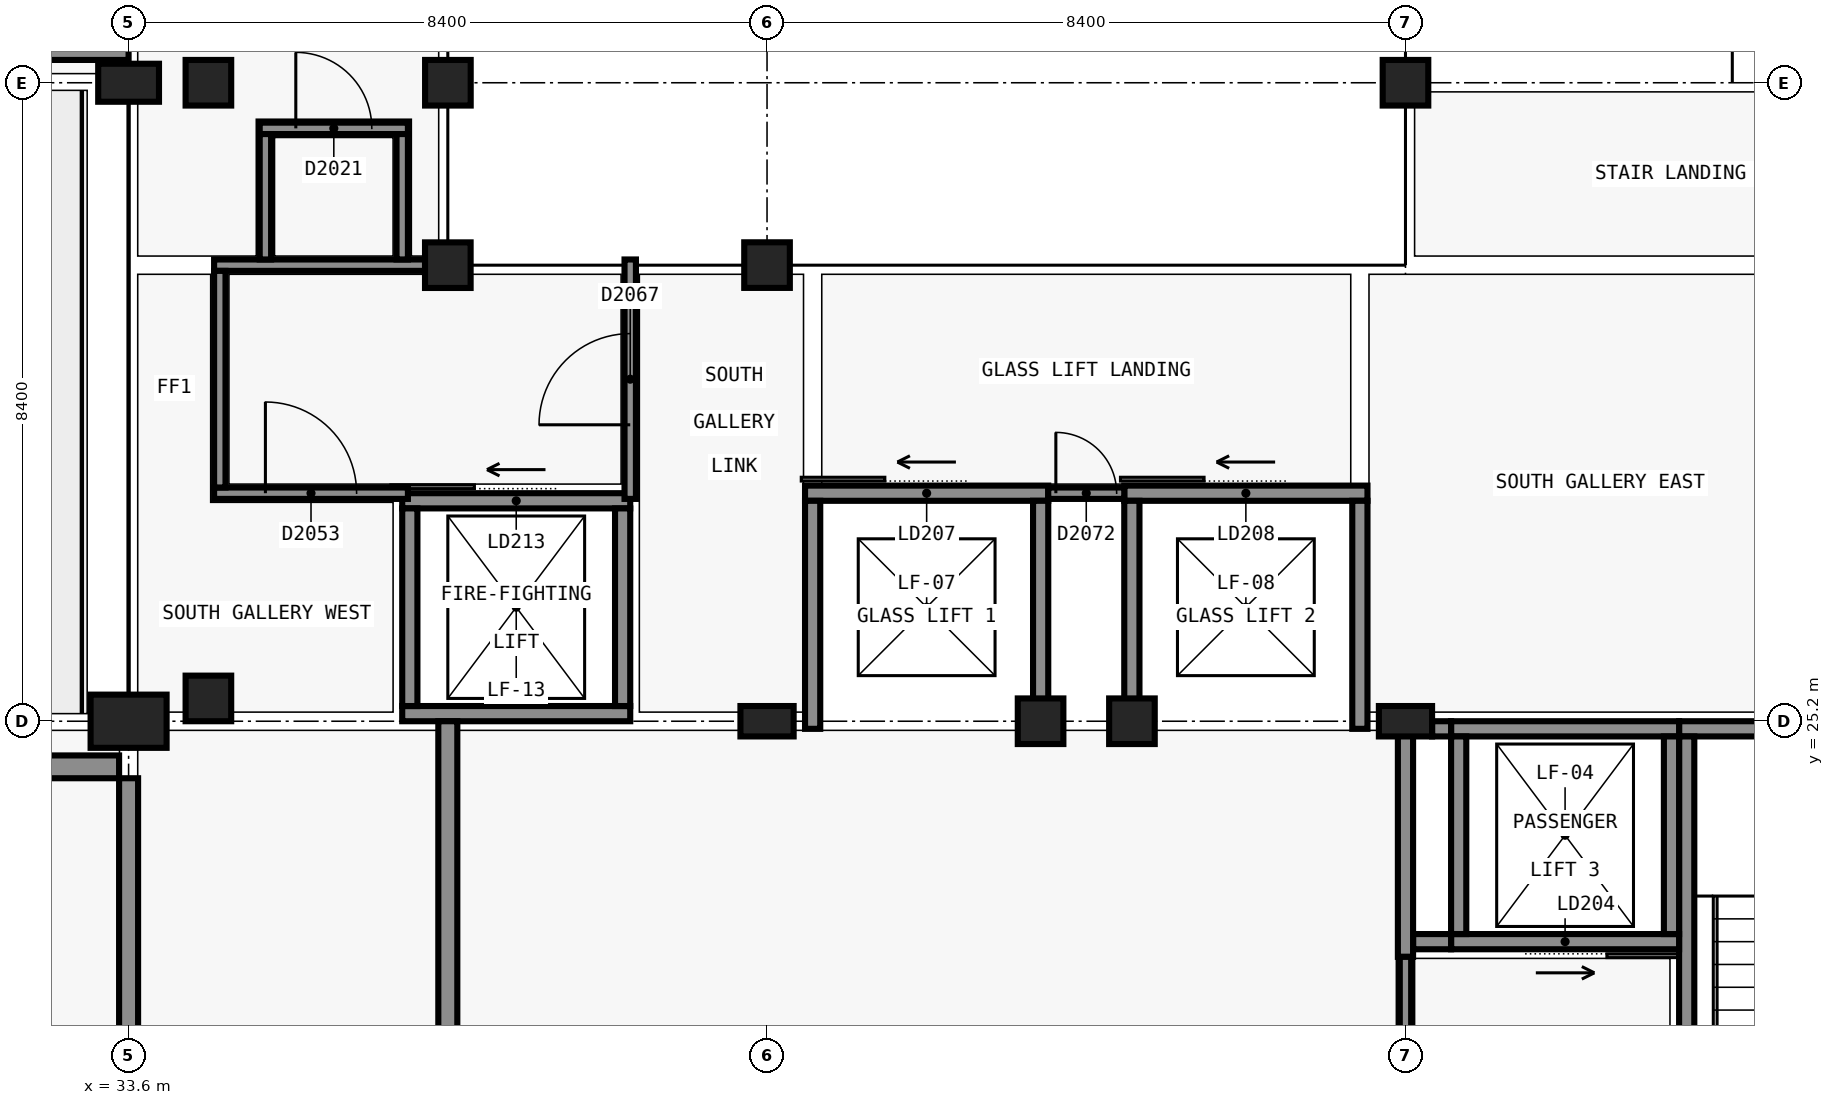
"""IFC4 building model, lengths in metres.
Left out: names, types, materials, properties, quantities, classifications, styles, units other than length and angle.
Written with IfcOpenShell. Run it as: python <this file> out.ifc"""

import sys

from ifc_helpers import new_model, si_unit, direction, frame, frame_2d, origin, origin_2d, place, context, subcontext, project, spatial, rectangle, extrude, element, fill, save


model = new_model("IFC4")
c1 = context("Model", 3, precision=1e-05, world=origin(), true_north=direction((0.0, 1.0)))
c2 = subcontext(c1, "Body", "Model", "MODEL_VIEW")
j1 = project(units=[si_unit("LENGTHUNIT", "METRE"), si_unit("PLANEANGLEUNIT", "RADIAN")], contexts=[c1])
p1 = place(None, origin())
s1 = spatial("IfcSite", under=j1, at=p1, CompositionType="ELEMENT")
p2 = place(p1, origin())
s2 = spatial("IfcBuilding", under=s1, at=p2, CompositionType="ELEMENT")
p3 = place(p2, frame((0.0, 0.0, 10.2)))
s3 = spatial("IfcBuildingStorey", under=s2, at=p3, CompositionType="ELEMENT", Elevation=10.2)
p4 = place(p3, frame((54.0, 25.1, 0.0), z_axis=(0.0, 0.0, 1.0), x_axis=(1.0, 0.0, 0.0)))
e1 = element("IfcWall", 1, at=p4, inside=s3, PredefinedType="SHEAR", context=c2, shape_type="SweptSolid", body=[
    extrude(rectangle(XDim=4.8, YDim=0.2, at=frame_2d((2.4, 0.0))), origin(), (0.0, 0.0, 1.0), 4.8),
])
p5 = place(p3, frame((54.1, 15.8, 0.0), z_axis=(0.0, 0.0, 1.0), x_axis=(0.0, 1.0, 0.0)))
e2 = element("IfcWall", 2, at=p5, inside=s3, PredefinedType="SHEAR", context=c2, shape_type="SweptSolid", body=[
    extrude(rectangle(XDim=9.2, YDim=0.2, at=frame_2d((4.6, 0.0))), origin(), (0.0, 0.0, 1.0), 4.8),
])
p6 = place(p5, frame((0.5, 0.0, 0.0)))
e3 = element("IfcOpeningElement", 3, at=p6, cuts=e2, PredefinedType="OPENING", context=c2, shape_type="SweptSolid", body=[
    extrude(rectangle(XDim=1.2, YDim=2.1, at=frame_2d((0.6, 1.05))), frame((0.0, 0.11, 0.0), z_axis=(0.0, -1.0, 0.0), x_axis=(1.0, 0.0, 0.0)), (0.0, 0.0, 1.0), 0.22),
])
p7 = place(p3, frame((54.0, 22.3, 0.0), z_axis=(0.0, 0.0, 1.0), x_axis=(-1.0, 0.0, 0.0)))
e4 = element("IfcWall", 4, at=p7, inside=s3, PredefinedType="SHEAR", context=c2, shape_type="SweptSolid", body=[
    extrude(rectangle(XDim=3.0, YDim=0.2, at=frame_2d((1.5, 0.0))), origin(), (0.0, 0.0, 1.0), 4.8),
])
p8 = place(p7, frame((0.95, 0.0, 0.0)))
e5 = element("IfcOpeningElement", 5, at=p8, cuts=e4, PredefinedType="OPENING", context=c2, shape_type="SweptSolid", body=[
    extrude(rectangle(XDim=1.1, YDim=2.1, at=frame_2d((0.55, 1.05))), frame((0.0, 0.11, 0.0), z_axis=(0.0, -1.0, 0.0), x_axis=(1.0, 0.0, 0.0)), (0.0, 0.0, 1.0), 0.22),
])
p9 = place(p3, frame((51.0, 25.1, 0.0), z_axis=(0.0, 0.0, 1.0), x_axis=(1.0, 0.0, 0.0)))
e6 = element("IfcWall", 6, at=p9, inside=s3, PredefinedType="SHEAR", context=c2, shape_type="SweptSolid", body=[
    extrude(rectangle(XDim=3.0, YDim=0.2, at=frame_2d((1.5, 0.0))), origin(), (0.0, 0.0, 1.0), 4.8),
])
for number, where, z_axis, x_axis in (
    (7, (51.1, 22.4, 0.0), (0.0, 0.0, 1.0), (0.0, 1.0, 0.0)),
    (8, (53.9, 25.0, 0.0), (0.0, 0.0, 1.0), (0.0, -1.0, 0.0)),
):
    element("IfcWall", number, at=place(p3, frame(where, z_axis=z_axis, x_axis=x_axis)), inside=s3, PredefinedType="SHEAR", context=c2, shape_type="SweptSolid", body=[
        extrude(rectangle(XDim=2.6, YDim=0.2, at=frame_2d((1.3, 0.0))), origin(), (0.0, 0.0, 1.0), 4.8),
    ])
p10 = place(p3, frame((40.2, 25.3, 0.0), z_axis=(0.0, 0.0, 1.0), x_axis=(-1.0, 0.0, 0.0)))
e9 = element("IfcWall", 9, at=p10, inside=s3, PredefinedType="SHEAR", context=c2, shape_type="SweptSolid", body=[
    extrude(rectangle(XDim=3.0, YDim=0.2, at=frame_2d((1.5, 0.0))), origin(), (0.0, 0.0, 1.0), 4.8),
])
p11 = place(p3, frame((37.2, 28.1, 0.0), z_axis=(0.0, 0.0, 1.0), x_axis=(1.0, 0.0, 0.0)))
e10 = element("IfcWall", 10, at=p11, inside=s3, PredefinedType="SHEAR", context=c2, shape_type="SweptSolid", body=[
    extrude(rectangle(XDim=3.0, YDim=0.2, at=frame_2d((1.5, 0.0))), origin(), (0.0, 0.0, 1.0), 4.8),
])
p12 = place(p11, frame((0.95, 0.0, 0.0)))
e11 = element("IfcOpeningElement", 11, at=p12, cuts=e10, PredefinedType="OPENING", context=c2, shape_type="SweptSolid", body=[
    extrude(rectangle(XDim=1.1, YDim=2.1, at=frame_2d((0.55, 1.05))), frame((0.0, 0.11, 0.0), z_axis=(0.0, -1.0, 0.0), x_axis=(1.0, 0.0, 0.0)), (0.0, 0.0, 1.0), 0.22),
])
for number, where, z_axis, x_axis in (
    (12, (37.3, 25.4, 0.0), (0.0, 0.0, 1.0), (0.0, 1.0, 0.0)),
    (13, (40.1, 28.0, 0.0), (0.0, 0.0, 1.0), (0.0, -1.0, 0.0)),
):
    element("IfcWall", number, at=place(p3, frame(where, z_axis=z_axis, x_axis=x_axis)), inside=s3, PredefinedType="SHEAR", context=c2, shape_type="SweptSolid", body=[
        extrude(rectangle(XDim=2.6, YDim=0.2, at=frame_2d((1.3, 0.0))), origin(), (0.0, 0.0, 1.0), 4.8),
    ])
p13 = place(p3, frame((33.6, 25.2, 0.0), z_axis=(0.0, 0.0, 1.0), x_axis=(1.0, 0.0, 0.0)))
e14 = element("IfcColumn", 14, at=p13, inside=s3, PredefinedType="COLUMN", context=c2, shape_type="SweptSolid", body=[
    extrude(rectangle(XDim=1.0, YDim=0.7, at=origin_2d()), origin(), (0.0, 0.0, 1.0), 4.8),
])
for number, where, z_axis, x_axis in (
    (15, (42.0, 25.2, 0.0), (0.0, 0.0, 1.0), (1.0, 0.0, 0.0)),
    (16, (50.4, 25.2, 0.0), (0.0, 0.0, 1.0), (1.0, 0.0, 0.0)),
):
    element("IfcColumn", number, at=place(p3, frame(where, z_axis=z_axis, x_axis=x_axis)), inside=s3, PredefinedType="COLUMN", context=c2, shape_type="SweptSolid", body=[
        extrude(rectangle(XDim=0.7, YDim=0.4, at=origin_2d()), origin(), (0.0, 0.0, 1.0), 4.8),
    ])
p14 = place(p3, frame((33.6, 33.6, 0.0), z_axis=(0.0, 0.0, 1.0), x_axis=(1.0, 0.0, 0.0)))
e17 = element("IfcColumn", 17, at=p14, inside=s3, PredefinedType="COLUMN", context=c2, shape_type="SweptSolid", body=[
    extrude(rectangle(XDim=0.8, YDim=0.5, at=origin_2d()), origin(), (0.0, 0.0, 1.0), 4.8),
])
for number, where, z_axis, x_axis in (
    (18, (50.4, 33.6, 0.0), (0.0, 0.0, 1.0), (1.0, 0.0, 0.0)),
    (19, (34.65, 25.5, 0.0), (0.0, 0.0, 1.0), (1.0, 0.0, 0.0)),
    (20, (34.65, 33.6, 0.0), (0.0, 0.0, 1.0), (1.0, 0.0, 0.0)),
):
    element("IfcColumn", number, at=place(p3, frame(where, z_axis=z_axis, x_axis=x_axis)), inside=s3, PredefinedType="COLUMN", context=c2, shape_type="SweptSolid", body=[
        extrude(rectangle(XDim=0.6, YDim=0.6, at=origin_2d()), origin(), (0.0, 0.0, 1.0), 4.8),
    ])
p15 = place(p3, frame((51.0, 22.3, 0.0), z_axis=(0.0, 0.0, 1.0), x_axis=(-1.0, 0.0, 0.0)))
e21 = element("IfcWall", 21, at=p15, inside=s3, PredefinedType="SHEAR", context=c2, shape_type="SweptSolid", body=[
    extrude(rectangle(XDim=0.5, YDim=0.2, at=frame_2d((0.25, 0.0))), origin(), (0.0, 0.0, 1.0), 4.8),
])
p16 = place(p3, frame((50.75, 25.1, 0.0), z_axis=(0.0, 0.0, 1.0), x_axis=(1.0, 0.0, 0.0)))
e22 = element("IfcWall", 22, at=p16, inside=s3, PredefinedType="SHEAR", context=c2, shape_type="SweptSolid", body=[
    extrude(rectangle(XDim=0.25, YDim=0.2, at=frame_2d((0.125, 0.0))), origin(), (0.0, 0.0, 1.0), 4.8),
])
for number, where, z_axis, x_axis in (
    (23, (45.599, 25.2, 0.0), (0.0, 0.0, 1.0), (1.0, 0.0, 0.0)),
    (24, (46.801, 25.2, 0.0), (0.0, 0.0, 1.0), (1.0, 0.0, 0.0)),
    (25, (37.8, 31.2, 0.0), (0.0, 0.0, 1.0), (1.0, 0.0, 0.0)),
    (26, (37.801, 33.6, 0.0), (0.0, 0.0, 1.0), (1.0, 0.0, 0.0)),
    (27, (42.0, 31.201, 0.0), (0.0, 0.0, 1.0), (1.0, 0.0, 0.0)),
):
    element("IfcColumn", number, at=place(p3, frame(where, z_axis=z_axis, x_axis=x_axis)), inside=s3, PredefinedType="COLUMN", context=c2, shape_type="SweptSolid", body=[
        extrude(rectangle(XDim=0.6, YDim=0.6, at=origin_2d()), origin(), (0.0, 0.0, 1.0), 4.8),
    ])
p17 = place(p3, frame((26.95, 24.6, 0.0), z_axis=(0.0, 0.0, 1.0), x_axis=(1.0, 0.0, 0.0)))
e28 = element("IfcWall", 28, at=p17, inside=s3, PredefinedType="SOLIDWALL", context=c2, shape_type="SweptSolid", body=[
    extrude(rectangle(XDim=6.525, YDim=0.3, at=frame_2d((3.262, 0.0))), origin(), (0.0, 0.0, 1.0), 4.5),
])
p18 = place(p17, frame((1.825, 0.0, 0.9)))
e29 = element("IfcOpeningElement", 29, at=p18, cuts=e28, PredefinedType="OPENING", context=c2, shape_type="SweptSolid", body=[
    extrude(rectangle(XDim=2.4, YDim=1.5, at=frame_2d((1.2, 0.75))), frame((0.0, 0.16, 0.0), z_axis=(0.0, -1.0, 0.0), x_axis=(1.0, 0.0, 0.0)), (0.0, 0.0, 1.0), 0.32),
])
p19 = place(p3, frame((33.6, 34.05, 0.0), z_axis=(0.0, 0.0, 1.0), x_axis=(-1.0, 0.0, 0.0)))
e30 = element("IfcWall", 30, at=p19, inside=s3, PredefinedType="SOLIDWALL", context=c2, shape_type="SweptSolid", body=[
    extrude(rectangle(XDim=4.2, YDim=0.3, at=frame_2d((2.1, 0.0))), origin(), (0.0, 0.0, 1.0), 4.5),
])
p20 = place(p3, frame((33.6, 8.6, 0.0), z_axis=(0.0, 0.0, 1.0), x_axis=(0.0, 1.0, 0.0)))
e31 = element("IfcWall", 31, at=p20, inside=s3, PredefinedType="SOLIDWALL", context=c2, shape_type="SweptSolid", body=[
    extrude(rectangle(XDim=15.85, YDim=0.25, at=frame_2d((7.925, 0.0))), origin(), (0.0, 0.0, 1.0), 3.8),
])
p21 = place(p3, frame((37.8, 8.525, 0.0), z_axis=(0.0, 0.0, 1.0), x_axis=(0.0, 1.0, 0.0)))
e32 = element("IfcWall", 32, at=p21, inside=s3, PredefinedType="PARTITIONING", context=c2, shape_type="SweptSolid", body=[
    extrude(rectangle(XDim=16.675, YDim=0.25, at=frame_2d((8.337, 0.0))), origin(), (0.0, 0.0, 1.0), 3.8),
])
p22 = place(p3, frame((42.5, 28.2, 0.0), z_axis=(0.0, 0.0, 1.0), x_axis=(1.0, 0.0, 0.0)))
e33 = element("IfcWall", 33, at=p22, inside=s3, PredefinedType="SHEAR", context=c2, shape_type="SweptSolid", body=[
    extrude(rectangle(XDim=3.2, YDim=0.2, at=frame_2d((1.6, 0.0))), origin(), (0.0, 0.0, 1.0), 4.5),
])
p23 = place(p22, frame((1.05, 0.0, 0.0)))
e34 = element("IfcOpeningElement", 34, at=p23, cuts=e33, PredefinedType="OPENING", context=c2, shape_type="SweptSolid", body=[
    extrude(rectangle(XDim=1.1, YDim=2.1, at=frame_2d((0.55, 1.05))), frame((0.0, 0.11, 0.0), z_axis=(0.0, -1.0, 0.0), x_axis=(1.0, 0.0, 0.0)), (0.0, 0.0, 1.0), 0.22),
])
p24 = place(p3, frame((46.7, 28.2, 0.0), z_axis=(0.0, 0.0, 1.0), x_axis=(1.0, 0.0, 0.0)))
e35 = element("IfcWall", 35, at=p24, inside=s3, PredefinedType="SHEAR", context=c2, shape_type="SweptSolid", body=[
    extrude(rectangle(XDim=3.2, YDim=0.2, at=frame_2d((1.6, 0.0))), origin(), (0.0, 0.0, 1.0), 4.5),
])
p25 = place(p24, frame((1.05, 0.0, 0.0)))
e36 = element("IfcOpeningElement", 36, at=p25, cuts=e35, PredefinedType="OPENING", context=c2, shape_type="SweptSolid", body=[
    extrude(rectangle(XDim=1.1, YDim=2.1, at=frame_2d((0.55, 1.05))), frame((0.0, 0.11, 0.0), z_axis=(0.0, -1.0, 0.0), x_axis=(1.0, 0.0, 0.0)), (0.0, 0.0, 1.0), 0.22),
])
for number, where, z_axis, x_axis in (
    (37, (42.6, 25.1, 0.0), (0.0, 0.0, 1.0), (0.0, 1.0, 0.0)),
    (38, (45.6, 25.1, 0.0), (0.0, 0.0, 1.0), (0.0, 1.0, 0.0)),
    (39, (46.8, 25.1, 0.0), (0.0, 0.0, 1.0), (0.0, 1.0, 0.0)),
    (40, (49.8, 25.1, 0.0), (0.0, 0.0, 1.0), (0.0, 1.0, 0.0)),
):
    element("IfcWall", number, at=place(p3, frame(where, z_axis=z_axis, x_axis=x_axis)), inside=s3, PredefinedType="SHEAR", context=c2, shape_type="SweptSolid", body=[
        extrude(rectangle(XDim=3.0, YDim=0.2, at=frame_2d((1.5, 0.0))), origin(), (0.0, 0.0, 1.0), 4.5),
    ])
p26 = place(p3, frame((50.4, 22.1, 0.0), z_axis=(0.0, 0.0, 1.0), x_axis=(0.0, 1.0, 0.0)))
e41 = element("IfcWall", 41, at=p26, inside=s3, PredefinedType="SHEAR", context=c2, shape_type="SweptSolid", body=[
    extrude(rectangle(XDim=3.2, YDim=0.2, at=frame_2d((1.6, 0.0))), origin(), (0.0, 0.0, 1.0), 4.5),
])
p27 = place(p3, frame((35.325, 33.0, 0.0), z_axis=(0.0, 0.0, 1.0), x_axis=(1.0, 0.0, 0.0)))
e42 = element("IfcWall", 42, at=p27, inside=s3, PredefinedType="PARTITIONING", context=c2, shape_type="SweptSolid", body=[
    extrude(rectangle(XDim=1.95, YDim=0.15, at=frame_2d((0.975, 0.0))), origin(), (0.0, 0.0, 1.0), 4.5),
])
p28 = place(p27, frame((0.475, 0.0, 0.0)))
e43 = element("IfcOpeningElement", 43, at=p28, cuts=e42, PredefinedType="OPENING", context=c2, shape_type="SweptSolid", body=[
    extrude(rectangle(XDim=1.0, YDim=2.1, at=frame_2d((0.5, 1.05))), frame((0.0, 0.085, 0.0), z_axis=(0.0, -1.0, 0.0), x_axis=(1.0, 0.0, 0.0)), (0.0, 0.0, 1.0), 0.17),
])
p29 = place(p3, frame((34.725, 28.2, 0.0), z_axis=(0.0, 0.0, 1.0), x_axis=(1.0, 0.0, 0.0)))
e44 = element("IfcWall", 44, at=p29, inside=s3, PredefinedType="SOLIDWALL", context=c2, shape_type="SweptSolid", body=[
    extrude(rectangle(XDim=2.55, YDim=0.15, at=frame_2d((1.275, 0.0))), origin(), (0.0, 0.0, 1.0), 4.5),
])
p30 = place(p29, frame((0.675, 0.0, 0.0)))
e45 = element("IfcOpeningElement", 45, at=p30, cuts=e44, PredefinedType="OPENING", context=c2, shape_type="SweptSolid", body=[
    extrude(rectangle(XDim=1.2, YDim=2.1, at=frame_2d((0.6, 1.05))), frame((0.0, 0.085, 0.0), z_axis=(0.0, -1.0, 0.0), x_axis=(1.0, 0.0, 0.0)), (0.0, 0.0, 1.0), 0.17),
])
p31 = place(p3, frame((34.725, 31.2, 0.0), z_axis=(0.0, 0.0, 1.0), x_axis=(1.0, 0.0, 0.0)))
e46 = element("IfcWall", 46, at=p31, inside=s3, PredefinedType="SOLIDWALL", context=c2, shape_type="SweptSolid", body=[
    extrude(rectangle(XDim=3.15, YDim=0.15, at=frame_2d((1.575, 0.0))), origin(), (0.0, 0.0, 1.0), 4.0),
])
p32 = place(p3, frame((45.7, 28.2, 0.0), z_axis=(0.0, 0.0, 1.0), x_axis=(1.0, 0.0, 0.0)))
e47 = element("IfcWall", 47, at=p32, inside=s3, PredefinedType="SOLIDWALL", context=c2, shape_type="SweptSolid", body=[
    extrude(rectangle(XDim=1.0, YDim=0.15, at=frame_2d((0.5, 0.0))), origin(), (0.0, 0.0, 1.0), 4.5),
])
p33 = place(p32, frame((0.1, 0.0, 0.0)))
e48 = element("IfcOpeningElement", 48, at=p33, cuts=e47, PredefinedType="OPENING", context=c2, shape_type="SweptSolid", body=[
    extrude(rectangle(XDim=0.8, YDim=2.1, at=frame_2d((0.4, 1.05))), frame((0.0, 0.085, 0.0), z_axis=(0.0, -1.0, 0.0), x_axis=(1.0, 0.0, 0.0)), (0.0, 0.0, 1.0), 0.17),
])
for number, where, z_axis, x_axis in (
    (49, (35.4, 31.275, 0.0), (0.0, 0.0, 1.0), (0.0, 1.0, 0.0)),
    (50, (37.2, 31.275, 0.0), (0.0, 0.0, 1.0), (0.0, 1.0, 0.0)),
):
    element("IfcWall", number, at=place(p3, frame(where, z_axis=z_axis, x_axis=x_axis)), inside=s3, PredefinedType="PARTITIONING", context=c2, shape_type="SweptSolid", body=[
        extrude(rectangle(XDim=1.65, YDim=0.15, at=frame_2d((0.825, 0.0))), origin(), (0.0, 0.0, 1.0), 4.5),
    ])
p34 = place(p3, frame((34.8, 28.275, 0.0), z_axis=(0.0, 0.0, 1.0), x_axis=(0.0, 1.0, 0.0)))
e51 = element("IfcWall", 51, at=p34, inside=s3, PredefinedType="SOLIDWALL", context=c2, shape_type="SweptSolid", body=[
    extrude(rectangle(XDim=2.85, YDim=0.15, at=frame_2d((1.425, 0.0))), origin(), (0.0, 0.0, 1.0), 4.5),
])
p35 = place(p3, frame((40.2, 28.125, 0.0), z_axis=(0.0, 0.0, 1.0), x_axis=(0.0, 1.0, 0.0)))
e52 = element("IfcWall", 52, at=p35, inside=s3, PredefinedType="SOLIDWALL", context=c2, shape_type="SweptSolid", body=[
    extrude(rectangle(XDim=3.15, YDim=0.15, at=frame_2d((1.575, 0.0))), origin(), (0.0, 0.0, 1.0), 4.0),
])
p36 = place(p35, frame((0.975, 0.0, 0.0)))
e53 = element("IfcOpeningElement", 53, at=p36, cuts=e52, PredefinedType="OPENING", context=c2, shape_type="SweptSolid", body=[
    extrude(rectangle(XDim=1.2, YDim=2.1, at=frame_2d((0.6, 1.05))), frame((0.0, 0.085, 0.0), z_axis=(0.0, -1.0, 0.0), x_axis=(1.0, 0.0, 0.0)), (0.0, 0.0, 1.0), 0.17),
])
p37 = place(p3, frame((50.4, 18.325, 0.0), z_axis=(0.0, 0.0, 1.0), x_axis=(0.0, 1.0, 0.0)))
e54 = element("IfcWall", 54, at=p37, inside=s3, PredefinedType="SOLIDWALL", context=c2, shape_type="SweptSolid", body=[
    extrude(rectangle(XDim=3.775, YDim=0.15, at=frame_2d((1.888, 0.0))), origin(), (0.0, 0.0, 1.0), 3.8),
])
p38 = place(p8, origin())
e55 = element("IfcDoor", 55, at=p38, inside=s3, OperationType="SLIDING_TO_LEFT", PredefinedType="DOOR", context=c2, shape_type="SweptSolid", body=[
    extrude(rectangle(XDim=1.1, YDim=2.1, at=frame_2d((0.55, 1.05))), frame((0.0, 0.025, 0.0), z_axis=(0.0, -1.0, 0.0), x_axis=(1.0, 0.0, 0.0)), (0.0, 0.0, 1.0), 0.05),
])
fill(e5, e55)
p39 = place(p23, origin())
e56 = element("IfcDoor", 56, at=p39, inside=s3, OperationType="SLIDING_TO_LEFT", PredefinedType="DOOR", context=c2, shape_type="SweptSolid", body=[
    extrude(rectangle(XDim=1.1, YDim=2.1, at=frame_2d((0.55, 1.05))), frame((0.0, 0.025, 0.0), z_axis=(0.0, -1.0, 0.0), x_axis=(1.0, 0.0, 0.0)), (0.0, 0.0, 1.0), 0.05),
])
fill(e34, e56)
p40 = place(p25, origin())
e57 = element("IfcDoor", 57, at=p40, inside=s3, OperationType="SLIDING_TO_LEFT", PredefinedType="DOOR", context=c2, shape_type="SweptSolid", body=[
    extrude(rectangle(XDim=1.1, YDim=2.1, at=frame_2d((0.55, 1.05))), frame((0.0, 0.025, 0.0), z_axis=(0.0, -1.0, 0.0), x_axis=(1.0, 0.0, 0.0)), (0.0, 0.0, 1.0), 0.05),
])
fill(e36, e57)
p41 = place(p12, origin())
e58 = element("IfcDoor", 58, at=p41, inside=s3, OperationType="SLIDING_TO_LEFT", PredefinedType="DOOR", context=c2, shape_type="SweptSolid", body=[
    extrude(rectangle(XDim=1.1, YDim=2.1, at=frame_2d((0.55, 1.05))), frame((0.0, 0.025, 0.0), z_axis=(0.0, -1.0, 0.0), x_axis=(1.0, 0.0, 0.0)), (0.0, 0.0, 1.0), 0.05),
])
fill(e11, e58)
p42 = place(p28, origin())
e59 = element("IfcDoor", 59, at=p42, inside=s3, OperationType="SINGLE_SWING_LEFT", PredefinedType="DOOR", context=c2, shape_type="SweptSolid", body=[
    extrude(rectangle(XDim=1.0, YDim=2.1, at=frame_2d((0.5, 1.05))), frame((0.0, 0.025, 0.0), z_axis=(0.0, -1.0, 0.0), x_axis=(1.0, 0.0, 0.0)), (0.0, 0.0, 1.0), 0.05),
])
fill(e43, e59)
p43 = place(p30, origin())
e60 = element("IfcDoor", 60, at=p43, inside=s3, OperationType="SINGLE_SWING_RIGHT", PredefinedType="DOOR", context=c2, shape_type="SweptSolid", body=[
    extrude(rectangle(XDim=1.2, YDim=2.1, at=frame_2d((0.6, 1.05))), frame((0.0, 0.025, 0.0), z_axis=(0.0, -1.0, 0.0), x_axis=(1.0, 0.0, 0.0)), (0.0, 0.0, 1.0), 0.05),
])
fill(e45, e60)
p44 = place(p36, origin())
e61 = element("IfcDoor", 61, at=p44, inside=s3, OperationType="SINGLE_SWING_RIGHT", PredefinedType="DOOR", context=c2, shape_type="SweptSolid", body=[
    extrude(rectangle(XDim=1.2, YDim=2.1, at=frame_2d((0.6, 1.05))), frame((0.0, 0.025, 0.0), z_axis=(0.0, -1.0, 0.0), x_axis=(1.0, 0.0, 0.0)), (0.0, 0.0, 1.0), 0.05),
])
fill(e53, e61)
p45 = place(p33, origin())
e62 = element("IfcDoor", 62, at=p45, inside=s3, OperationType="SINGLE_SWING_RIGHT", PredefinedType="DOOR", context=c2, shape_type="SweptSolid", body=[
    extrude(rectangle(XDim=0.8, YDim=2.1, at=frame_2d((0.4, 1.05))), frame((0.0, 0.025, 0.0), z_axis=(0.0, -1.0, 0.0), x_axis=(1.0, 0.0, 0.0)), (0.0, 0.0, 1.0), 0.05),
])
fill(e48, e62)
save(model, sys.argv[1])
